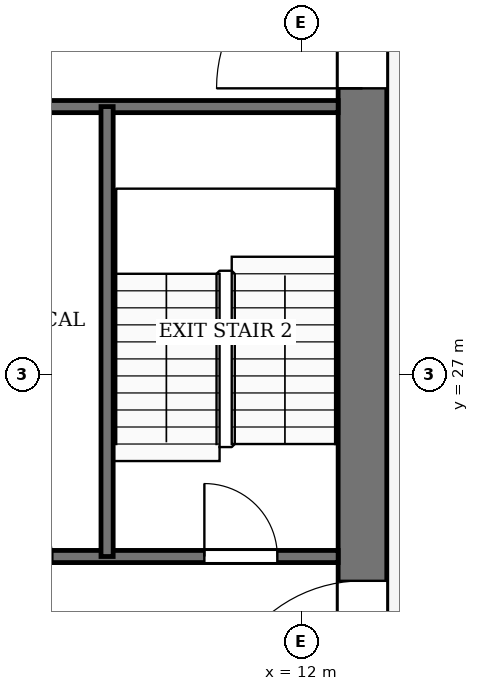
"""IFC4 building model, lengths in metres.
Left out: names, types, materials, properties, quantities, classifications, styles, units other than length and angle.
Written with IfcOpenShell. Run it as: python <this file> out.ifc"""

import sys

from ifc_helpers import new_model, si_unit, direction, frame, frame_2d, origin, place, context, subcontext, project, spatial, rectangle, extrude, element, fill, save


model = new_model("IFC4")
c1 = context("Model", 3, precision=1e-05, world=origin(), true_north=direction((0.0, 1.0)))
c2 = subcontext(c1, "Body", "Model", "MODEL_VIEW")
j1 = project(units=[si_unit("LENGTHUNIT", "METRE"), si_unit("PLANEANGLEUNIT", "RADIAN")], contexts=[c1])
p1 = place(None, origin())
s1 = spatial("IfcSite", under=j1, at=p1, CompositionType="ELEMENT")
p2 = place(p1, origin())
s2 = spatial("IfcBuilding", under=s1, at=p2, CompositionType="ELEMENT")
p3 = place(p2, frame((0.0, 0.0, 238.0)))
s3 = spatial("IfcBuildingStorey", under=s2, at=p3, CompositionType="ELEMENT", Elevation=238.0)
p4 = place(p3, frame((13.0, 18.4, -0.13), z_axis=(0.0, 0.0, 1.0), x_axis=(0.0, 1.0, 0.0)))
e1 = element("IfcWall", 1, at=p4, inside=s3, PredefinedType="SHEAR", context=c2, shape_type="SweptSolid", body=[
    extrude(rectangle(XDim=19.2, YDim=0.8, at=frame_2d((9.6, 0.0))), origin(), (0.0, 0.0, 1.0), 4.0),
])
p5 = place(p4, frame((2.8, 0.0, 0.13)))
e2 = element("IfcOpeningElement", 2, at=p5, cuts=e1, PredefinedType="OPENING", context=c2, shape_type="SweptSolid", body=[
    extrude(rectangle(XDim=2.4, YDim=2.4, at=frame_2d((1.2, 1.2))), frame((0.0, 0.41, 0.0), z_axis=(0.0, -1.0, 0.0), x_axis=(1.0, 0.0, 0.0)), (0.0, 0.0, 1.0), 0.82),
])
p6 = place(p4, frame((13.3, 0.0, 0.13)))
e3 = element("IfcOpeningElement", 3, at=p6, cuts=e1, PredefinedType="OPENING", context=c2, shape_type="SweptSolid", body=[
    extrude(rectangle(XDim=2.4, YDim=2.4, at=frame_2d((1.2, 1.2))), frame((0.0, 0.41, 0.0), z_axis=(0.0, -1.0, 0.0), x_axis=(1.0, 0.0, 0.0)), (0.0, 0.0, 1.0), 0.82),
])
p7 = place(p3, frame((6.0, 24.0, 0.0), z_axis=(0.0, 0.0, 1.0), x_axis=(1.0, 0.0, 0.0)))
e4 = element("IfcWall", 4, at=p7, inside=s3, PredefinedType="PARTITIONING", context=c2, shape_type="SweptSolid", body=[
    extrude(rectangle(XDim=6.6, YDim=0.2, at=frame_2d((3.3, 0.0))), origin(), (0.0, 0.0, 1.0), 3.87),
])
p8 = place(p7, frame((0.9, 0.0, 0.0)))
e5 = element("IfcOpeningElement", 5, at=p8, cuts=e4, PredefinedType="OPENING", context=c2, shape_type="SweptSolid", body=[
    extrude(rectangle(XDim=1.0, YDim=2.1, at=frame_2d((0.5, 1.05))), frame((0.0, 0.11, 0.0), z_axis=(0.0, -1.0, 0.0), x_axis=(1.0, 0.0, 0.0)), (0.0, 0.0, 1.0), 0.22),
])
p9 = place(p7, frame((4.4, 0.0, 0.0)))
e6 = element("IfcOpeningElement", 6, at=p9, cuts=e4, PredefinedType="OPENING", context=c2, shape_type="SweptSolid", body=[
    extrude(rectangle(XDim=1.2, YDim=2.2, at=frame_2d((0.6, 1.1))), frame((0.0, 0.11, 0.0), z_axis=(0.0, -1.0, 0.0), x_axis=(1.0, 0.0, 0.0)), (0.0, 0.0, 1.0), 0.22),
])
p10 = place(p3, frame((6.0, 31.4, 0.0), z_axis=(0.0, 0.0, 1.0), x_axis=(1.0, 0.0, 0.0)))
e7 = element("IfcWall", 7, at=p10, inside=s3, PredefinedType="PARTITIONING", context=c2, shape_type="SweptSolid", body=[
    extrude(rectangle(XDim=6.6, YDim=0.2, at=frame_2d((3.3, 0.0))), origin(), (0.0, 0.0, 1.0), 3.87),
])
p11 = place(p3, frame((8.8, 24.0, 0.0), z_axis=(0.0, 0.0, 1.0), x_axis=(0.0, 1.0, 0.0)))
e8 = element("IfcWall", 8, at=p11, inside=s3, PredefinedType="PARTITIONING", context=c2, shape_type="SweptSolid", body=[
    extrude(rectangle(XDim=7.4, YDim=0.2, at=frame_2d((3.7, 0.0))), origin(), (0.0, 0.0, 1.0), 3.87),
])
p12 = place(p9, origin())
e9 = element("IfcDoor", 9, at=p12, inside=s3, OperationType="SINGLE_SWING_LEFT", PredefinedType="DOOR", context=c2, shape_type="SweptSolid", body=[
    extrude(rectangle(XDim=1.2, YDim=2.2, at=frame_2d((0.6, 1.1))), frame((0.0, 0.025, 0.0), z_axis=(0.0, -1.0, 0.0), x_axis=(1.0, 0.0, 0.0)), (0.0, 0.0, 1.0), 0.05),
])
fill(e6, e9)
p13 = place(p5, origin())
e10 = element("IfcDoor", 10, at=p13, inside=s3, OperationType="DOUBLE_DOOR_SINGLE_SWING", PredefinedType="DOOR", context=c2, shape_type="SweptSolid", body=[
    extrude(rectangle(XDim=2.4, YDim=2.4, at=frame_2d((1.2, 1.2))), frame((0.0, 0.025, 0.0), z_axis=(0.0, -1.0, 0.0), x_axis=(1.0, 0.0, 0.0)), (0.0, 0.0, 1.0), 0.05),
])
fill(e2, e10)
p14 = place(p6, origin())
e11 = element("IfcDoor", 11, at=p14, inside=s3, OperationType="DOUBLE_DOOR_SINGLE_SWING", PredefinedType="DOOR", context=c2, shape_type="SweptSolid", body=[
    extrude(rectangle(XDim=2.4, YDim=2.4, at=frame_2d((1.2, 1.2))), frame((0.0, 0.025, 0.0), z_axis=(0.0, -1.0, 0.0), x_axis=(1.0, 0.0, 0.0)), (0.0, 0.0, 1.0), 0.05),
])
fill(e3, e11)
save(model, sys.argv[1])
